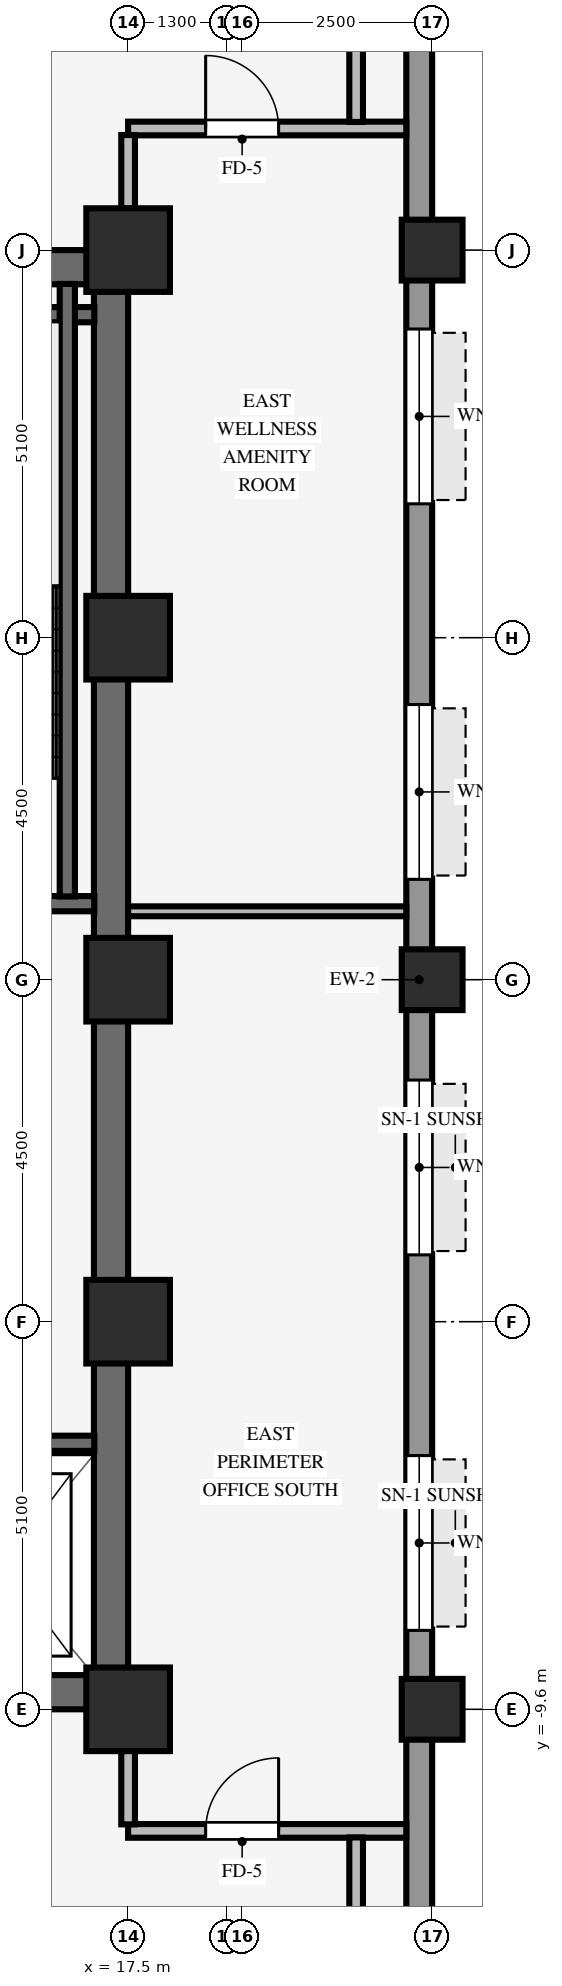
"""IFC4 building model, lengths in metres.
Left out: names, types, materials, properties, quantities, classifications, styles, units other than length and angle.
Written with IfcOpenShell. Run it as: python <this file> out.ifc"""

import sys

from ifc_helpers import new_model, si_unit, direction, frame, frame_2d, origin, origin_2d, place, context, subcontext, project, spatial, rectangle, hollow_rectangle, extrude, source, transform, mapped, element, fill, save


model = new_model("IFC4")
c1 = context("Model", 3, precision=1e-05, world=origin(), true_north=direction((0.0, 1.0)))
c2 = subcontext(c1, "Body", "Model", "MODEL_VIEW")
j1 = project(units=[si_unit("LENGTHUNIT", "METRE"), si_unit("PLANEANGLEUNIT", "RADIAN")], contexts=[c1])
p1 = place(None, origin())
s1 = spatial("IfcSite", under=j1, at=p1, CompositionType="ELEMENT")
p2 = place(p1, origin())
s2 = spatial("IfcBuilding", under=s1, at=p2, CompositionType="ELEMENT")
p3 = place(p2, frame((0.0, 0.0, 60.45)))
s3 = spatial("IfcBuildingStorey", under=s2, at=p3, CompositionType="ELEMENT", Elevation=60.45)
for number, where, z_axis, x_axis in (
    (1, (9.0, -9.375, 0.0), (0.0, 0.0, 1.0), (1.0, 0.0, 0.0)),
    (2, (9.0, 9.375, 0.0), (0.0, 0.0, 1.0), (1.0, 0.0, 0.0)),
):
    element("IfcWall", number, at=place(p3, frame(where, z_axis=z_axis, x_axis=x_axis)), inside=s3, PredefinedType="SHEAR", context=c2, shape_type="SweptSolid", body=[
        extrude(rectangle(XDim=8.5, YDim=0.45, at=frame_2d((4.25, 0.0))), origin(), (0.0, 0.0, 1.0), 3.37),
    ])
p4 = place(p3, frame((17.275, -9.155, 0.0), z_axis=(0.0, 0.0, 1.0), x_axis=(0.0, 1.0, 0.0)))
e3 = element("IfcWall", 3, at=p4, inside=s3, PredefinedType="SHEAR", context=c2, shape_type="SweptSolid", body=[
    extrude(rectangle(XDim=18.31, YDim=0.45, at=frame_2d((9.155, 0.0))), origin(), (0.0, 0.0, 1.0), 3.37),
])
for number, where, z_axis, x_axis in (
    (4, (17.5, -9.6, 0.0), (0.0, 0.0, 1.0), (1.0, 0.0, 0.0)),
    (5, (17.5, -4.5, 0.0), (0.0, 0.0, 1.0), (1.0, 0.0, 0.0)),
    (6, (17.5, 4.5, 0.0), (0.0, 0.0, 1.0), (1.0, 0.0, 0.0)),
    (7, (17.5, 9.6, 0.0), (0.0, 0.0, 1.0), (1.0, 0.0, 0.0)),
    (8, (17.5, 0.0, 0.0), (0.0, 0.0, 1.0), (1.0, 0.0, 0.0)),
):
    element("IfcColumn", number, at=place(p3, frame(where, z_axis=z_axis, x_axis=x_axis)), inside=s3, PredefinedType="COLUMN", context=c2, shape_type="SweptSolid", body=[
        extrude(rectangle(XDim=1.1, YDim=1.1, at=origin_2d()), origin(), (0.0, 0.0, 1.0), 3.37),
    ])
for number, where, z_axis, x_axis in (
    (9, (21.5, -9.6, 0.0), (0.0, 0.0, 1.0), (1.0, 0.0, 0.0)),
    (10, (21.5, 0.0, 0.0), (0.0, 0.0, 1.0), (1.0, 0.0, 0.0)),
    (11, (21.5, 9.6, 0.0), (0.0, 0.0, 1.0), (1.0, 0.0, 0.0)),
):
    element("IfcColumn", number, at=place(p3, frame(where, z_axis=z_axis, x_axis=x_axis)), inside=s3, PredefinedType="COLUMN", context=c2, shape_type="SweptSolid", body=[
        extrude(hollow_rectangle(XDim=0.8, YDim=0.8, WallThickness=0.055, InnerFilletRadius=0.055, OuterFilletRadius=0.11, at=origin_2d()), origin(), (0.0, 0.0, 1.0), 3.37),
    ])
p5 = place(p3, frame((21.33, -20.764, 0.0), z_axis=(0.0, 0.0, 1.0), x_axis=(0.0, 1.0, 0.0)))
e12 = element("IfcWall", 12, at=p5, inside=s3, PredefinedType="STANDARD", context=c2, shape_type="SweptSolid", body=[
    extrude(rectangle(XDim=41.528, YDim=0.34, at=frame_2d((20.764, 0.0))), origin(), (0.0, 0.0, 1.0), 2.705),
])
p6 = place(p5, frame((12.202, 0.0, 0.8)))
e13 = element("IfcOpeningElement", 13, at=p6, cuts=e12, PredefinedType="OPENING", context=c2, shape_type="SweptSolid", body=[
    extrude(rectangle(XDim=2.3, YDim=1.62, at=frame_2d((1.15, 0.81))), frame((0.0, 0.18, 0.0), z_axis=(0.0, -1.0, 0.0), x_axis=(1.0, 0.0, 0.0)), (0.0, 0.0, 1.0), 0.36),
])
p7 = place(p5, frame((17.144, 0.0, 0.8)))
e14 = element("IfcOpeningElement", 14, at=p7, cuts=e12, PredefinedType="OPENING", context=c2, shape_type="SweptSolid", body=[
    extrude(rectangle(XDim=2.3, YDim=1.62, at=frame_2d((1.15, 0.81))), frame((0.0, 0.18, 0.0), z_axis=(0.0, -1.0, 0.0), x_axis=(1.0, 0.0, 0.0)), (0.0, 0.0, 1.0), 0.36),
])
p8 = place(p5, frame((22.084, 0.0, 0.8)))
e15 = element("IfcOpeningElement", 15, at=p8, cuts=e12, PredefinedType="OPENING", context=c2, shape_type="SweptSolid", body=[
    extrude(rectangle(XDim=2.3, YDim=1.62, at=frame_2d((1.15, 0.81))), frame((0.0, 0.18, 0.0), z_axis=(0.0, -1.0, 0.0), x_axis=(1.0, 0.0, 0.0)), (0.0, 0.0, 1.0), 0.36),
])
p9 = place(p5, frame((27.025, 0.0, 0.8)))
e16 = element("IfcOpeningElement", 16, at=p9, cuts=e12, PredefinedType="OPENING", context=c2, shape_type="SweptSolid", body=[
    extrude(rectangle(XDim=2.3, YDim=1.62, at=frame_2d((1.15, 0.81))), frame((0.0, 0.18, 0.0), z_axis=(0.0, -1.0, 0.0), x_axis=(1.0, 0.0, 0.0)), (0.0, 0.0, 1.0), 0.36),
])
for number, where, z_axis, x_axis in (
    (17, (13.535, 1.0, 0.0), (0.0, 0.0, 1.0), (1.0, 0.0, 0.0)),
    (18, (13.535, 8.75, 0.0), (0.0, 0.0, 1.0), (1.0, 0.0, 0.0)),
):
    element("IfcWall", number, at=place(p3, frame(where, z_axis=z_axis, x_axis=x_axis)), inside=s3, PredefinedType="SHEAR", context=c2, shape_type="SweptSolid", body=[
        extrude(rectangle(XDim=3.52, YDim=0.2, at=frame_2d((1.76, 0.0))), origin(), (0.0, 0.0, 1.0), 3.37),
    ])
p10 = place(p3, frame((16.7, 1.095, 0.0), z_axis=(0.0, 0.0, 1.0), x_axis=(0.0, 1.0, 0.0)))
e19 = element("IfcWall", 19, at=p10, inside=s3, PredefinedType="SHEAR", context=c2, shape_type="SweptSolid", body=[
    extrude(rectangle(XDim=8.06, YDim=0.2, at=frame_2d((4.03, 0.0))), origin(), (0.0, 0.0, 1.0), 3.37),
])
p11 = place(p3, frame((14.645, -6.1, 0.0), z_axis=(0.0, 0.0, 1.0), x_axis=(1.0, 0.0, 0.0)))
e20 = element("IfcWall", 20, at=p11, inside=s3, PredefinedType="SHEAR", context=c2, shape_type="SweptSolid", body=[
    extrude(rectangle(XDim=2.41, YDim=0.2, at=frame_2d((1.205, 0.0))), origin(), (0.0, 0.0, 1.0), 3.37),
])
p12 = place(p3, frame((17.5, -11.2, 0.0), z_axis=(0.0, 0.0, 1.0), x_axis=(1.0, 0.0, 0.0)))
e21 = element("IfcWall", 21, at=p12, inside=s3, PredefinedType="PARTITIONING", context=c2, shape_type="SweptSolid", body=[
    extrude(rectangle(XDim=3.66, YDim=0.18, at=frame_2d((1.83, 0.0))), origin(), (0.0, 0.0, 1.0), 3.36),
])
p13 = place(p12, frame((1.02, 0.0, 0.0)))
e22 = element("IfcOpeningElement", 22, at=p13, cuts=e21, PredefinedType="OPENING", context=c2, shape_type="SweptSolid", body=[
    extrude(rectangle(XDim=0.96, YDim=2.1, at=frame_2d((0.48, 1.05))), frame((0.0, 0.1, 0.0), z_axis=(0.0, -1.0, 0.0), x_axis=(1.0, 0.0, 0.0)), (0.0, 0.0, 1.0), 0.2),
])
p14 = place(p3, frame((17.5, 0.9, 0.0), z_axis=(0.0, 0.0, 1.0), x_axis=(1.0, 0.0, 0.0)))
e23 = element("IfcWall", 23, at=p14, inside=s3, PredefinedType="PARTITIONING", context=c2, shape_type="SweptSolid", body=[
    extrude(rectangle(XDim=3.66, YDim=0.13, at=frame_2d((1.83, 0.0))), origin(), (0.0, 0.0, 1.0), 3.36),
])
p15 = place(p3, frame((17.5, 11.2, 0.0), z_axis=(0.0, 0.0, 1.0), x_axis=(1.0, 0.0, 0.0)))
e24 = element("IfcWall", 24, at=p15, inside=s3, PredefinedType="PARTITIONING", context=c2, shape_type="SweptSolid", body=[
    extrude(rectangle(XDim=3.66, YDim=0.18, at=frame_2d((1.83, 0.0))), origin(), (0.0, 0.0, 1.0), 3.36),
])
p16 = place(p15, frame((1.02, 0.0, 0.0)))
e25 = element("IfcOpeningElement", 25, at=p16, cuts=e24, PredefinedType="OPENING", context=c2, shape_type="SweptSolid", body=[
    extrude(rectangle(XDim=0.96, YDim=2.1, at=frame_2d((0.48, 1.05))), frame((0.0, 0.1, 0.0), z_axis=(0.0, -1.0, 0.0), x_axis=(1.0, 0.0, 0.0)), (0.0, 0.0, 1.0), 0.2),
])
for number, where, z_axis, x_axis in (
    (26, (17.5, -11.114, 0.0), (0.0, 0.0, 1.0), (0.0, 1.0, 0.0)),
    (27, (17.5, 10.146, 0.0), (0.0, 0.0, 1.0), (0.0, 1.0, 0.0)),
):
    element("IfcWall", number, at=place(p3, frame(where, z_axis=z_axis, x_axis=x_axis)), inside=s3, PredefinedType="PARTITIONING", context=c2, shape_type="SweptSolid", body=[
        extrude(rectangle(XDim=0.968, YDim=0.18, at=frame_2d((0.484, 0.0))), origin(), (0.0, 0.0, 1.0), 2.738),
    ])
for number, where, z_axis, x_axis in (
    (28, (20.5, -13.514, 0.0), (0.0, 0.0, 1.0), (0.0, 1.0, 0.0)),
    (29, (20.5, 11.286, 0.0), (0.0, 0.0, 1.0), (0.0, 1.0, 0.0)),
):
    element("IfcWall", number, at=place(p3, frame(where, z_axis=z_axis, x_axis=x_axis)), inside=s3, PredefinedType="PARTITIONING", context=c2, shape_type="SweptSolid", body=[
        extrude(rectangle(XDim=2.228, YDim=0.18, at=frame_2d((1.114, 0.0))), origin(), (0.0, 0.0, 1.0), 3.36),
    ])
m1 = source(origin(), c2, "Body", "SweptSolid", [
    extrude(rectangle(XDim=2.3, YDim=1.62, at=frame_2d((1.15, 0.81))), frame((0.0, 0.03, 0.0), z_axis=(0.0, -1.0, 0.0), x_axis=(1.0, 0.0, 0.0)), (0.0, 0.0, 1.0), 0.06),
])
p17 = place(p6, origin())
e30 = element("IfcWindow", 30, at=p17, inside=s3, PartitioningType="SINGLE_PANEL", PredefinedType="WINDOW", context=c2, shape_type="MappedRepresentation", body=[
    mapped(m1, transform((0.0, 0.0, 0.0), scale=1.0)),
])
fill(e13, e30)
p18 = place(p7, origin())
e31 = element("IfcWindow", 31, at=p18, inside=s3, PartitioningType="SINGLE_PANEL", PredefinedType="WINDOW", context=c2, shape_type="MappedRepresentation", body=[
    mapped(m1, transform((0.0, 0.0, 0.0), scale=1.0)),
])
fill(e14, e31)
p19 = place(p8, origin())
e32 = element("IfcWindow", 32, at=p19, inside=s3, PartitioningType="SINGLE_PANEL", PredefinedType="WINDOW", context=c2, shape_type="MappedRepresentation", body=[
    mapped(m1, transform((0.0, 0.0, 0.0), scale=1.0)),
])
fill(e15, e32)
p20 = place(p9, origin())
e33 = element("IfcWindow", 33, at=p20, inside=s3, PartitioningType="SINGLE_PANEL", PredefinedType="WINDOW", context=c2, shape_type="MappedRepresentation", body=[
    mapped(m1, transform((0.0, 0.0, 0.0), scale=1.0)),
])
fill(e16, e33)
m2 = source(origin(), c2, "Body", "SweptSolid", [
    extrude(rectangle(XDim=0.96, YDim=2.1, at=frame_2d((0.48, 1.05))), frame((0.0, 0.025, 0.0), z_axis=(0.0, -1.0, 0.0), x_axis=(1.0, 0.0, 0.0)), (0.0, 0.0, 1.0), 0.05),
])
p21 = place(p13, origin())
e34 = element("IfcDoor", 34, at=p21, inside=s3, OperationType="SINGLE_SWING_RIGHT", PredefinedType="DOOR", context=c2, shape_type="MappedRepresentation", body=[
    mapped(m2, transform((0.0, 0.0, 0.0), scale=1.0)),
])
fill(e22, e34)
p22 = place(p16, origin())
e35 = element("IfcDoor", 35, at=p22, inside=s3, OperationType="SINGLE_SWING_LEFT", PredefinedType="DOOR", context=c2, shape_type="MappedRepresentation", body=[
    mapped(m2, transform((0.0, 0.0, 0.0), scale=1.0)),
])
fill(e25, e35)
save(model, sys.argv[1])
